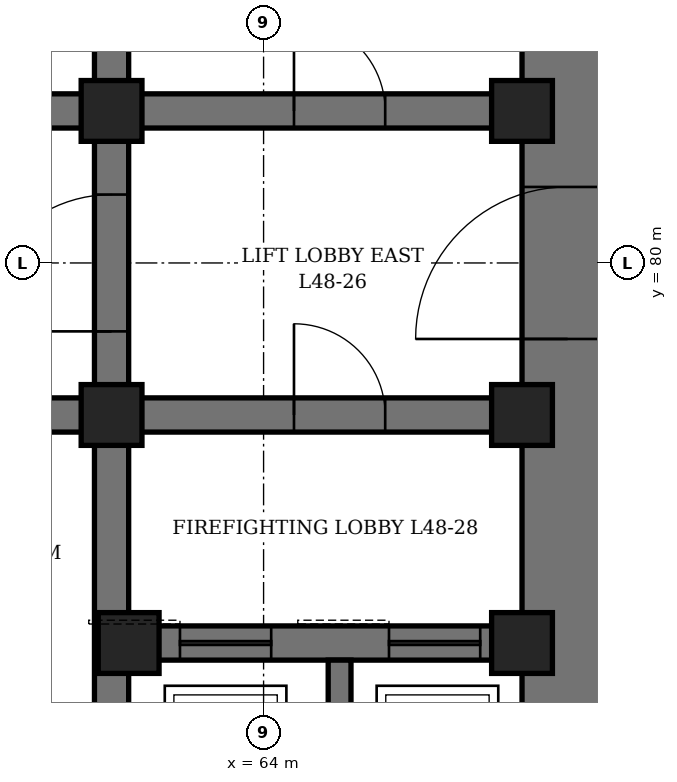
"""IFC4 building model, lengths in metres.
Left out: names, types, materials, properties, quantities, classifications, styles, units other than length and angle.
Written with IfcOpenShell. Run it as: python <this file> out.ifc"""

import sys

from ifc_helpers import new_model, si_unit, direction, frame, frame_2d, origin, origin_2d, place, context, subcontext, project, spatial, rectangle, hollow_rectangle, extrude, element, fill, save


model = new_model("IFC4")
c1 = context("Model", 3, precision=1e-05, world=origin(), true_north=direction((0.0, 1.0)))
c2 = subcontext(c1, "Body", "Model", "MODEL_VIEW")
j1 = project(units=[si_unit("LENGTHUNIT", "METRE"), si_unit("PLANEANGLEUNIT", "RADIAN")], contexts=[c1])
p1 = place(None, origin())
s1 = spatial("IfcSite", under=j1, at=p1, CompositionType="ELEMENT")
p2 = place(p1, origin())
s2 = spatial("IfcBuilding", under=s1, at=p2, CompositionType="ELEMENT")
p3 = place(p2, frame((0.0, 0.0, 214.9)))
s3 = spatial("IfcBuildingStorey", under=s2, at=p3, CompositionType="ELEMENT", Elevation=214.9)
p4 = place(p3, frame((68.0, 70.4, 0.0), z_axis=(0.0, 0.0, 1.0), x_axis=(0.0, 1.0, 0.0)))
e1 = element("IfcWall", 1, at=p4, inside=s3, PredefinedType="SHEAR", context=c2, shape_type="SweptSolid", body=[
    extrude(rectangle(XDim=19.2, YDim=1.2, at=frame_2d((9.6, 0.0))), origin(), (0.0, 0.0, 1.0), 4.2),
])
p5 = place(p4, frame((8.6, 0.0, 0.0)))
e2 = element("IfcOpeningElement", 2, at=p5, cuts=e1, PredefinedType="OPENING", context=c2, shape_type="SweptSolid", body=[
    extrude(rectangle(XDim=2.0, YDim=2.4, at=frame_2d((1.0, 1.2))), frame((0.0, 0.61, 0.0), z_axis=(0.0, -1.0, 0.0), x_axis=(1.0, 0.0, 0.0)), (0.0, 0.0, 1.0), 1.22),
])
p6 = place(p3, frame((62.0, 71.6, 0.0), z_axis=(0.0, 0.0, 1.0), x_axis=(0.0, 1.0, 0.0)))
e3 = element("IfcWall", 3, at=p6, inside=s3, PredefinedType="SHEAR", context=c2, shape_type="SweptSolid", body=[
    extrude(rectangle(XDim=16.8, YDim=0.45, at=frame_2d((8.4, 0.0))), origin(), (0.0, 0.0, 1.0), 4.2),
])
p7 = place(p6, frame((7.5, 0.0, 0.0)))
e4 = element("IfcOpeningElement", 4, at=p7, cuts=e3, PredefinedType="OPENING", context=c2, shape_type="SweptSolid", body=[
    extrude(rectangle(XDim=1.8, YDim=2.4, at=frame_2d((0.9, 1.2))), frame((0.0, 0.235, 0.0), z_axis=(0.0, -1.0, 0.0), x_axis=(1.0, 0.0, 0.0)), (0.0, 0.0, 1.0), 0.47),
])
p8 = place(p3, frame((62.225, 75.0, 0.0), z_axis=(0.0, 0.0, 1.0), x_axis=(1.0, 0.0, 0.0)))
e5 = element("IfcWall", 5, at=p8, inside=s3, PredefinedType="SHEAR", context=c2, shape_type="SweptSolid", body=[
    extrude(rectangle(XDim=5.175, YDim=0.45, at=frame_2d((2.587, 0.0))), origin(), (0.0, 0.0, 1.0), 4.2),
])
p9 = place(p8, frame((0.675, 0.0, 0.0)))
e6 = element("IfcOpeningElement", 6, at=p9, cuts=e5, PredefinedType="OPENING", context=c2, shape_type="SweptSolid", body=[
    extrude(rectangle(XDim=1.2, YDim=2.2, at=frame_2d((0.6, 1.1))), frame((0.0, 0.235, 0.0), z_axis=(0.0, -1.0, 0.0), x_axis=(1.0, 0.0, 0.0)), (0.0, 0.0, 1.0), 0.47),
])
p10 = place(p8, frame((3.425, 0.0, 0.0)))
e7 = element("IfcOpeningElement", 7, at=p10, cuts=e5, PredefinedType="OPENING", context=c2, shape_type="SweptSolid", body=[
    extrude(rectangle(XDim=1.2, YDim=2.2, at=frame_2d((0.6, 1.1))), frame((0.0, 0.235, 0.0), z_axis=(0.0, -1.0, 0.0), x_axis=(1.0, 0.0, 0.0)), (0.0, 0.0, 1.0), 0.47),
])
p11 = place(p3, frame((62.225, 78.0, 0.0), z_axis=(0.0, 0.0, 1.0), x_axis=(1.0, 0.0, 0.0)))
e8 = element("IfcWall", 8, at=p11, inside=s3, PredefinedType="SHEAR", context=c2, shape_type="SweptSolid", body=[
    extrude(rectangle(XDim=5.175, YDim=0.45, at=frame_2d((2.587, 0.0))), origin(), (0.0, 0.0, 1.0), 4.2),
])
p12 = place(p11, frame((2.175, 0.0, 0.0)))
e9 = element("IfcOpeningElement", 9, at=p12, cuts=e8, PredefinedType="OPENING", context=c2, shape_type="SweptSolid", body=[
    extrude(rectangle(XDim=1.2, YDim=2.1, at=frame_2d((0.6, 1.05))), frame((0.0, 0.235, 0.0), z_axis=(0.0, -1.0, 0.0), x_axis=(1.0, 0.0, 0.0)), (0.0, 0.0, 1.0), 0.47),
])
p13 = place(p3, frame((62.225, 82.0, 0.0), z_axis=(0.0, 0.0, 1.0), x_axis=(1.0, 0.0, 0.0)))
e10 = element("IfcWall", 10, at=p13, inside=s3, PredefinedType="SHEAR", context=c2, shape_type="SweptSolid", body=[
    extrude(rectangle(XDim=5.175, YDim=0.45, at=frame_2d((2.587, 0.0))), origin(), (0.0, 0.0, 1.0), 4.2),
])
p14 = place(p13, frame((2.175, 0.0, 0.0)))
e11 = element("IfcOpeningElement", 11, at=p14, cuts=e10, PredefinedType="OPENING", context=c2, shape_type="SweptSolid", body=[
    extrude(rectangle(XDim=1.2, YDim=2.1, at=frame_2d((0.6, 1.05))), frame((0.0, 0.235, 0.0), z_axis=(0.0, -1.0, 0.0), x_axis=(1.0, 0.0, 0.0)), (0.0, 0.0, 1.0), 0.47),
])
p15 = place(p3, frame((50.225, 78.0, 0.0), z_axis=(0.0, 0.0, 1.0), x_axis=(1.0, 0.0, 0.0)))
e12 = element("IfcWall", 12, at=p15, inside=s3, PredefinedType="SHEAR", context=c2, shape_type="SweptSolid", body=[
    extrude(rectangle(XDim=11.55, YDim=0.45, at=frame_2d((5.775, 0.0))), origin(), (0.0, 0.0, 1.0), 4.2),
])
p16 = place(p15, frame((0.825, 0.0, 0.0)))
e13 = element("IfcOpeningElement", 13, at=p16, cuts=e12, PredefinedType="OPENING", context=c2, shape_type="SweptSolid", body=[
    extrude(rectangle(XDim=0.9, YDim=2.1, at=frame_2d((0.45, 1.05))), frame((0.0, 0.235, 0.0), z_axis=(0.0, -1.0, 0.0), x_axis=(1.0, 0.0, 0.0)), (0.0, 0.0, 1.0), 0.47),
])
p17 = place(p15, frame((3.825, 0.0, 0.0)))
e14 = element("IfcOpeningElement", 14, at=p17, cuts=e12, PredefinedType="OPENING", context=c2, shape_type="SweptSolid", body=[
    extrude(rectangle(XDim=0.9, YDim=2.1, at=frame_2d((0.45, 1.05))), frame((0.0, 0.235, 0.0), z_axis=(0.0, -1.0, 0.0), x_axis=(1.0, 0.0, 0.0)), (0.0, 0.0, 1.0), 0.47),
])
p18 = place(p15, frame((6.825, 0.0, 0.0)))
e15 = element("IfcOpeningElement", 15, at=p18, cuts=e12, PredefinedType="OPENING", context=c2, shape_type="SweptSolid", body=[
    extrude(rectangle(XDim=0.9, YDim=2.1, at=frame_2d((0.45, 1.05))), frame((0.0, 0.235, 0.0), z_axis=(0.0, -1.0, 0.0), x_axis=(1.0, 0.0, 0.0)), (0.0, 0.0, 1.0), 0.47),
])
p19 = place(p15, frame((9.825, 0.0, 0.0)))
e16 = element("IfcOpeningElement", 16, at=p19, cuts=e12, PredefinedType="OPENING", context=c2, shape_type="SweptSolid", body=[
    extrude(rectangle(XDim=0.9, YDim=2.1, at=frame_2d((0.45, 1.05))), frame((0.0, 0.235, 0.0), z_axis=(0.0, -1.0, 0.0), x_axis=(1.0, 0.0, 0.0)), (0.0, 0.0, 1.0), 0.47),
])
p20 = place(p3, frame((50.225, 82.0, 0.0), z_axis=(0.0, 0.0, 1.0), x_axis=(1.0, 0.0, 0.0)))
e17 = element("IfcWall", 17, at=p20, inside=s3, PredefinedType="SHEAR", context=c2, shape_type="SweptSolid", body=[
    extrude(rectangle(XDim=11.55, YDim=0.45, at=frame_2d((5.775, 0.0))), origin(), (0.0, 0.0, 1.0), 4.2),
])
p21 = place(p20, frame((0.825, 0.0, 0.0)))
e18 = element("IfcOpeningElement", 18, at=p21, cuts=e17, PredefinedType="OPENING", context=c2, shape_type="SweptSolid", body=[
    extrude(rectangle(XDim=0.9, YDim=2.1, at=frame_2d((0.45, 1.05))), frame((0.0, 0.235, 0.0), z_axis=(0.0, -1.0, 0.0), x_axis=(1.0, 0.0, 0.0)), (0.0, 0.0, 1.0), 0.47),
])
p22 = place(p20, frame((3.825, 0.0, 0.0)))
e19 = element("IfcOpeningElement", 19, at=p22, cuts=e17, PredefinedType="OPENING", context=c2, shape_type="SweptSolid", body=[
    extrude(rectangle(XDim=0.9, YDim=2.1, at=frame_2d((0.45, 1.05))), frame((0.0, 0.235, 0.0), z_axis=(0.0, -1.0, 0.0), x_axis=(1.0, 0.0, 0.0)), (0.0, 0.0, 1.0), 0.47),
])
p23 = place(p20, frame((6.825, 0.0, 0.0)))
e20 = element("IfcOpeningElement", 20, at=p23, cuts=e17, PredefinedType="OPENING", context=c2, shape_type="SweptSolid", body=[
    extrude(rectangle(XDim=0.9, YDim=2.1, at=frame_2d((0.45, 1.05))), frame((0.0, 0.235, 0.0), z_axis=(0.0, -1.0, 0.0), x_axis=(1.0, 0.0, 0.0)), (0.0, 0.0, 1.0), 0.47),
])
p24 = place(p20, frame((9.825, 0.0, 0.0)))
e21 = element("IfcOpeningElement", 21, at=p24, cuts=e17, PredefinedType="OPENING", context=c2, shape_type="SweptSolid", body=[
    extrude(rectangle(XDim=0.9, YDim=2.1, at=frame_2d((0.45, 1.05))), frame((0.0, 0.235, 0.0), z_axis=(0.0, -1.0, 0.0), x_axis=(1.0, 0.0, 0.0)), (0.0, 0.0, 1.0), 0.47),
])
p25 = place(p3, frame((65.0, 71.6, 0.0), z_axis=(0.0, 0.0, 1.0), x_axis=(0.0, 1.0, 0.0)))
e22 = element("IfcWall", 22, at=p25, inside=s3, PredefinedType="SHEAR", context=c2, shape_type="SweptSolid", body=[
    extrude(rectangle(XDim=3.175, YDim=0.3, at=frame_2d((1.587, 0.0))), origin(), (0.0, 0.0, 1.0), 4.2),
])
for number, where, z_axis, x_axis in (
    (23, (62.0, 78.0, 0.0), (0.0, 0.0, 1.0), (1.0, 0.0, 0.0)),
    (24, (62.0, 82.0, 0.0), (0.0, 0.0, 1.0), (1.0, 0.0, 0.0)),
    (25, (62.225, 75.0, 0.0), (0.0, 0.0, 1.0), (1.0, 0.0, 0.0)),
    (26, (67.4, 75.0, 0.0), (0.0, 0.0, 1.0), (1.0, 0.0, 0.0)),
    (27, (67.4, 78.0, 0.0), (0.0, 0.0, 1.0), (1.0, 0.0, 0.0)),
    (28, (67.4, 82.0, 0.0), (0.0, 0.0, 1.0), (1.0, 0.0, 0.0)),
):
    element("IfcColumn", number, at=place(p3, frame(where, z_axis=z_axis, x_axis=x_axis)), inside=s3, PredefinedType="COLUMN", context=c2, shape_type="SweptSolid", body=[
        extrude(hollow_rectangle(XDim=0.8, YDim=0.8, WallThickness=0.1, at=origin_2d()), origin(), (0.0, 0.0, 1.0), 4.2),
    ])
p26 = place(p14, origin())
e29 = element("IfcDoor", 29, at=p26, inside=s3, OperationType="SINGLE_SWING_LEFT", PredefinedType="DOOR", context=c2, shape_type="SweptSolid", body=[
    extrude(rectangle(XDim=1.2, YDim=2.1, at=frame_2d((0.6, 1.05))), frame((0.0, 0.225, 0.0), z_axis=(0.0, -1.0, 0.0), x_axis=(1.0, 0.0, 0.0)), (0.0, 0.0, 1.0), 0.449),
])
fill(e11, e29)
p27 = place(p5, origin())
e30 = element("IfcDoor", 30, at=p27, inside=s3, OperationType="DOUBLE_DOOR_SINGLE_SWING", PredefinedType="DOOR", context=c2, shape_type="SweptSolid", body=[
    extrude(rectangle(XDim=2.0, YDim=2.4, at=frame_2d((1.0, 1.2))), frame((0.0, 0.35, 0.0), z_axis=(0.0, -1.0, 0.0), x_axis=(1.0, 0.0, 0.0)), (0.0, 0.0, 1.0), 0.7),
])
fill(e2, e30)
p28 = place(p7, origin())
e31 = element("IfcDoor", 31, at=p28, inside=s3, OperationType="DOUBLE_DOOR_SINGLE_SWING", PredefinedType="DOOR", context=c2, shape_type="SweptSolid", body=[
    extrude(rectangle(XDim=1.8, YDim=2.4, at=frame_2d((0.9, 1.2))), frame((0.0, 0.225, 0.0), z_axis=(0.0, -1.0, 0.0), x_axis=(1.0, 0.0, 0.0)), (0.0, 0.0, 1.0), 0.449),
])
fill(e4, e31)
p29 = place(p12, origin())
e32 = element("IfcDoor", 32, at=p29, inside=s3, OperationType="SINGLE_SWING_RIGHT", PredefinedType="DOOR", context=c2, shape_type="SweptSolid", body=[
    extrude(rectangle(XDim=1.2, YDim=2.1, at=frame_2d((0.6, 1.05))), frame((0.0, 0.225, 0.0), z_axis=(0.0, -1.0, 0.0), x_axis=(1.0, 0.0, 0.0)), (0.0, 0.0, 1.0), 0.449),
])
fill(e9, e32)
p30 = place(p9, origin())
e33 = element("IfcDoor", 33, at=p30, inside=s3, OperationType="SLIDING_TO_LEFT", PredefinedType="DOOR", context=c2, shape_type="SweptSolid", body=[
    extrude(rectangle(XDim=1.2, YDim=2.2, at=frame_2d((0.6, 1.1))), frame((0.0, 0.225, 0.0), z_axis=(0.0, -1.0, 0.0), x_axis=(1.0, 0.0, 0.0)), (0.0, 0.0, 1.0), 0.449),
])
fill(e6, e33)
p31 = place(p10, origin())
e34 = element("IfcDoor", 34, at=p31, inside=s3, OperationType="SLIDING_TO_LEFT", PredefinedType="DOOR", context=c2, shape_type="SweptSolid", body=[
    extrude(rectangle(XDim=1.2, YDim=2.2, at=frame_2d((0.6, 1.1))), frame((0.0, 0.225, 0.0), z_axis=(0.0, -1.0, 0.0), x_axis=(1.0, 0.0, 0.0)), (0.0, 0.0, 1.0), 0.449),
])
fill(e7, e34)
save(model, sys.argv[1])
